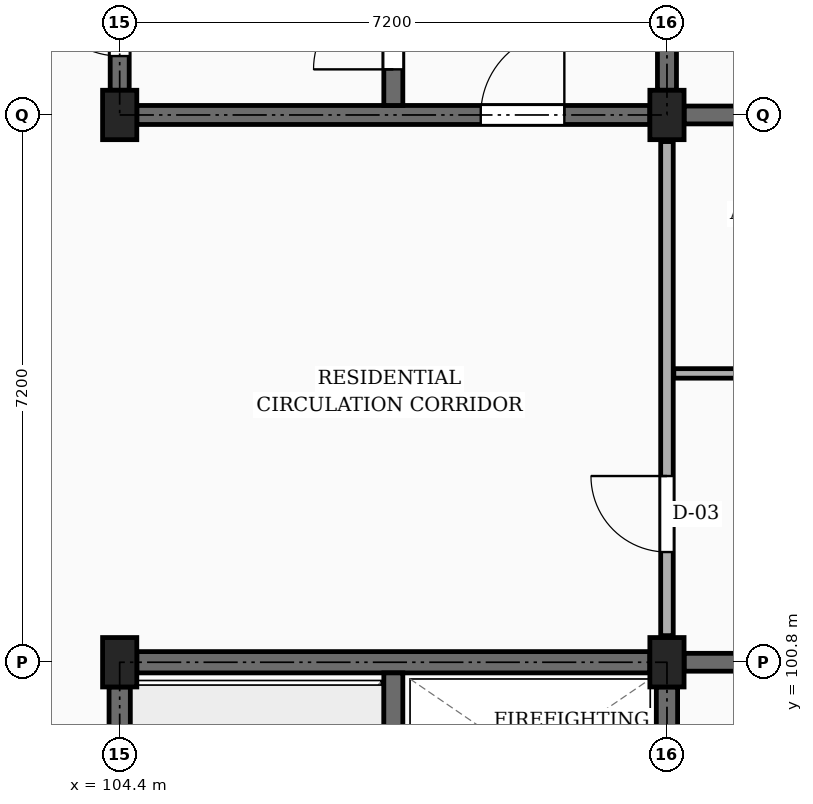
"""IFC4 building model, lengths in metres.
Left out: names, types, materials, properties, quantities, classifications, styles, units other than length and angle.
Written with IfcOpenShell. Run it as: python <this file> out.ifc"""

import sys

from ifc_helpers import new_model, si_unit, direction, frame, frame_2d, origin, origin_2d, place, context, subcontext, project, spatial, rectangle, extrude, element, fill, save


model = new_model("IFC4")
c1 = context("Model", 3, precision=1e-05, world=origin(), true_north=direction((0.0, 1.0)))
c2 = subcontext(c1, "Body", "Model", "MODEL_VIEW")
j1 = project(units=[si_unit("LENGTHUNIT", "METRE"), si_unit("PLANEANGLEUNIT", "RADIAN")], contexts=[c1])
p1 = place(None, origin())
s1 = spatial("IfcSite", under=j1, at=p1, CompositionType="ELEMENT")
p2 = place(p1, origin())
s2 = spatial("IfcBuilding", under=s1, at=p2, CompositionType="ELEMENT")
p3 = place(p2, frame((0.0, 0.0, 17.1)))
s3 = spatial("IfcBuildingStorey", under=s2, at=p3, CompositionType="ELEMENT", Elevation=17.1)
for number, where, z_axis, x_axis in (
    (1, (104.4, 100.8, 0.0), (0.0, 0.0, 1.0), (1.0, 0.0, 0.0)),
    (2, (104.4, 108.0, 0.0), (0.0, 0.0, 1.0), (1.0, 0.0, 0.0)),
    (3, (111.6, 100.8, 0.0), (0.0, 0.0, 1.0), (1.0, 0.0, 0.0)),
    (4, (111.6, 108.0, 0.0), (0.0, 0.0, 1.0), (1.0, 0.0, 0.0)),
):
    element("IfcColumn", number, at=place(p3, frame(where, z_axis=z_axis, x_axis=x_axis)), inside=s3, PredefinedType="COLUMN", context=c2, shape_type="SweptSolid", body=[
        extrude(rectangle(XDim=0.45, YDim=0.65, at=origin_2d()), origin(), (0.0, 0.0, 1.0), 3.15),
    ])
p4 = place(p3, frame((111.825, 100.8, 0.0), z_axis=(0.0, 0.0, 1.0), x_axis=(1.0, 0.0, 0.0)))
e5 = element("IfcWall", 5, at=p4, inside=s3, PredefinedType="SOLIDWALL", context=c2, shape_type="SweptSolid", body=[
    extrude(rectangle(XDim=6.7, YDim=0.235, at=frame_2d((3.35, 0.0))), origin(), (0.0, 0.0, 1.0), 2.19),
])
p5 = place(p3, frame((111.825, 108.0, 0.0), z_axis=(0.0, 0.0, 1.0), x_axis=(1.0, 0.0, 0.0)))
e6 = element("IfcWall", 6, at=p5, inside=s3, PredefinedType="SOLIDWALL", context=c2, shape_type="SweptSolid", body=[
    extrude(rectangle(XDim=6.7, YDim=0.235, at=frame_2d((3.35, 0.0))), origin(), (0.0, 0.0, 1.0), 2.19),
])
p6 = place(p5, frame((4.35, 0.0, 0.0)))
e7 = element("IfcOpeningElement", 7, at=p6, cuts=e6, PredefinedType="OPENING", context=c2, shape_type="SweptSolid", body=[
    extrude(rectangle(XDim=0.98, YDim=2.12, at=frame_2d((0.49, 1.06))), frame((0.0, 0.127, 0.0), z_axis=(0.0, -1.0, 0.0), x_axis=(1.0, 0.0, 0.0)), (0.0, 0.0, 1.0), 0.255),
])
p7 = place(p3, frame((104.4, 93.925, 0.0), z_axis=(0.0, 0.0, 1.0), x_axis=(0.0, 1.0, 0.0)))
e8 = element("IfcWall", 8, at=p7, inside=s3, PredefinedType="SHEAR", context=c2, shape_type="SweptSolid", body=[
    extrude(rectangle(XDim=6.55, YDim=0.28, at=frame_2d((3.275, 0.0))), origin(), (0.0, 0.0, 1.0), 2.89),
])
p8 = place(p7, frame((0.45, 0.0, 0.0)))
e9 = element("IfcOpeningElement", 9, at=p8, cuts=e8, PredefinedType="OPENING", context=c2, shape_type="SweptSolid", body=[
    extrude(rectangle(XDim=1.05, YDim=2.15, at=frame_2d((0.525, 1.075))), frame((0.0, 0.15, 0.0), z_axis=(0.0, -1.0, 0.0), x_axis=(1.0, 0.0, 0.0)), (0.0, 0.0, 1.0), 0.3),
])
p9 = place(p3, frame((104.625, 100.8, 0.0), z_axis=(0.0, 0.0, 1.0), x_axis=(1.0, 0.0, 0.0)))
e10 = element("IfcWall", 10, at=p9, inside=s3, PredefinedType="SHEAR", context=c2, shape_type="SweptSolid", body=[
    extrude(rectangle(XDim=6.75, YDim=0.28, at=frame_2d((3.375, 0.0))), origin(), (0.0, 0.0, 1.0), 2.89),
])
p10 = place(p3, frame((111.6, 93.925, 0.0), z_axis=(0.0, 0.0, 1.0), x_axis=(0.0, 1.0, 0.0)))
e11 = element("IfcWall", 11, at=p10, inside=s3, PredefinedType="SHEAR", context=c2, shape_type="SweptSolid", body=[
    extrude(rectangle(XDim=6.55, YDim=0.28, at=frame_2d((3.275, 0.0))), origin(), (0.0, 0.0, 1.0), 2.89),
])
p11 = place(p3, frame((108.0, 93.74, 0.0), z_axis=(0.0, 0.0, 1.0), x_axis=(0.0, 1.0, 0.0)))
e12 = element("IfcWall", 12, at=p11, inside=s3, PredefinedType="SHEAR", context=c2, shape_type="SweptSolid", body=[
    extrude(rectangle(XDim=6.92, YDim=0.25, at=frame_2d((3.46, 0.0))), origin(), (0.0, 0.0, 1.0), 2.89),
])
p12 = place(p11, frame((0.46, 0.0, 0.0)))
e13 = element("IfcOpeningElement", 13, at=p12, cuts=e12, PredefinedType="OPENING", context=c2, shape_type="SweptSolid", body=[
    extrude(rectangle(XDim=1.05, YDim=2.15, at=frame_2d((0.525, 1.075))), frame((0.0, 0.135, 0.0), z_axis=(0.0, -1.0, 0.0), x_axis=(1.0, 0.0, 0.0)), (0.0, 0.0, 1.0), 0.27),
])
p13 = place(p3, frame((104.4, 108.325, 0.0), z_axis=(0.0, 0.0, 1.0), x_axis=(0.0, 1.0, 0.0)))
e14 = element("IfcWall", 14, at=p13, inside=s3, PredefinedType="SHEAR", context=c2, shape_type="SweptSolid", body=[
    extrude(rectangle(XDim=6.55, YDim=0.25, at=frame_2d((3.275, 0.0))), origin(), (0.0, 0.0, 1.0), 2.89),
])
p14 = place(p13, frame((0.45, 0.0, 0.0)))
e15 = element("IfcOpeningElement", 15, at=p14, cuts=e14, PredefinedType="OPENING", context=c2, shape_type="SweptSolid", body=[
    extrude(rectangle(XDim=1.05, YDim=2.15, at=frame_2d((0.525, 1.075))), frame((0.0, 0.135, 0.0), z_axis=(0.0, -1.0, 0.0), x_axis=(1.0, 0.0, 0.0)), (0.0, 0.0, 1.0), 0.27),
])
p15 = place(p3, frame((111.6, 108.325, 0.0), z_axis=(0.0, 0.0, 1.0), x_axis=(0.0, 1.0, 0.0)))
e16 = element("IfcWall", 16, at=p15, inside=s3, PredefinedType="SHEAR", context=c2, shape_type="SweptSolid", body=[
    extrude(rectangle(XDim=6.55, YDim=0.25, at=frame_2d((3.275, 0.0))), origin(), (0.0, 0.0, 1.0), 2.89),
])
p16 = place(p3, frame((104.625, 108.0, 0.0), z_axis=(0.0, 0.0, 1.0), x_axis=(1.0, 0.0, 0.0)))
e17 = element("IfcWall", 17, at=p16, inside=s3, PredefinedType="SHEAR", context=c2, shape_type="SweptSolid", body=[
    extrude(rectangle(XDim=6.75, YDim=0.25, at=frame_2d((3.375, 0.0))), origin(), (0.0, 0.0, 1.0), 2.89),
])
p17 = place(p16, frame((4.525, 0.0, 0.0)))
e18 = element("IfcOpeningElement", 18, at=p17, cuts=e17, PredefinedType="OPENING", context=c2, shape_type="SweptSolid", body=[
    extrude(rectangle(XDim=1.1, YDim=2.15, at=frame_2d((0.55, 1.075))), frame((0.0, 0.135, 0.0), z_axis=(0.0, -1.0, 0.0), x_axis=(1.0, 0.0, 0.0)), (0.0, 0.0, 1.0), 0.27),
])
p18 = place(p3, frame((108.0, 108.125, 0.0), z_axis=(0.0, 0.0, 1.0), x_axis=(0.0, 1.0, 0.0)))
e19 = element("IfcWall", 19, at=p18, inside=s3, PredefinedType="SHEAR", context=c2, shape_type="SweptSolid", body=[
    extrude(rectangle(XDim=6.95, YDim=0.25, at=frame_2d((3.475, 0.0))), origin(), (0.0, 0.0, 1.0), 2.89),
])
p19 = place(p18, frame((0.475, 0.0, 0.0)))
e20 = element("IfcOpeningElement", 20, at=p19, cuts=e19, PredefinedType="OPENING", context=c2, shape_type="SweptSolid", body=[
    extrude(rectangle(XDim=1.05, YDim=2.15, at=frame_2d((0.525, 1.075))), frame((0.0, 0.135, 0.0), z_axis=(0.0, -1.0, 0.0), x_axis=(1.0, 0.0, 0.0)), (0.0, 0.0, 1.0), 0.27),
])
p20 = place(p3, frame((111.6, 101.15, 0.0), z_axis=(0.0, 0.0, 1.0), x_axis=(0.0, 1.0, 0.0)))
e21 = element("IfcWall", 21, at=p20, inside=s3, PredefinedType="PARTITIONING", context=c2, shape_type="SweptSolid", body=[
    extrude(rectangle(XDim=6.5, YDim=0.165, at=frame_2d((3.25, 0.0))), origin(), (0.0, 0.0, 1.0), 2.325),
])
p21 = place(p20, frame((1.1, 0.0, 0.0)))
e22 = element("IfcOpeningElement", 22, at=p21, cuts=e21, PredefinedType="OPENING", context=c2, shape_type="SweptSolid", body=[
    extrude(rectangle(XDim=1.0, YDim=2.15, at=frame_2d((0.5, 1.075))), frame((0.0, 0.093, 0.0), z_axis=(0.0, -1.0, 0.0), x_axis=(1.0, 0.0, 0.0)), (0.0, 0.0, 1.0), 0.185),
])
p22 = place(p3, frame((111.69, 104.6, 0.0), z_axis=(0.0, 0.0, 1.0), x_axis=(1.0, 0.0, 0.0)))
e23 = element("IfcWall", 23, at=p22, inside=s3, PredefinedType="PARTITIONING", context=c2, shape_type="SweptSolid", body=[
    extrude(rectangle(XDim=6.935, YDim=0.125, at=frame_2d((3.468, 0.0))), origin(), (0.0, 0.0, 1.0), 2.325),
])
p23 = place(p22, frame((1.1, 0.0, 0.0)))
e24 = element("IfcOpeningElement", 24, at=p23, cuts=e23, PredefinedType="OPENING", context=c2, shape_type="SweptSolid", body=[
    extrude(rectangle(XDim=0.87, YDim=2.05, at=frame_2d((0.435, 1.025))), frame((0.0, 0.073, 0.0), z_axis=(0.0, -1.0, 0.0), x_axis=(1.0, 0.0, 0.0)), (0.0, 0.0, 1.0), 0.145),
])
p24 = place(p22, frame((4.5, 0.0, 0.0)))
e25 = element("IfcOpeningElement", 25, at=p24, cuts=e23, PredefinedType="OPENING", context=c2, shape_type="SweptSolid", body=[
    extrude(rectangle(XDim=0.92, YDim=2.1, at=frame_2d((0.46, 1.05))), frame((0.0, 0.073, 0.0), z_axis=(0.0, -1.0, 0.0), x_axis=(1.0, 0.0, 0.0)), (0.0, 0.0, 1.0), 0.145),
])
p25 = place(p14, origin())
e26 = element("IfcDoor", 26, at=p25, inside=s3, OperationType="SINGLE_SWING_RIGHT", PredefinedType="DOOR", context=c2, shape_type="SweptSolid", body=[
    extrude(rectangle(XDim=1.05, YDim=2.15, at=frame_2d((0.525, 1.075))), frame((0.0, 0.025, 0.0), z_axis=(0.0, -1.0, 0.0), x_axis=(1.0, 0.0, 0.0)), (0.0, 0.0, 1.0), 0.05),
])
fill(e15, e26)
p26 = place(p17, frame((1.1, 0.0, 0.0), z_axis=(0.0, 0.0, 1.0), x_axis=(-1.0, 0.0, 0.0)))
e27 = element("IfcDoor", 27, at=p26, inside=s3, OperationType="SINGLE_SWING_RIGHT", PredefinedType="DOOR", context=c2, shape_type="SweptSolid", body=[
    extrude(rectangle(XDim=1.1, YDim=2.15, at=frame_2d((0.55, 1.075))), frame((0.0, 0.025, 0.0), z_axis=(0.0, -1.0, 0.0), x_axis=(1.0, 0.0, 0.0)), (0.0, 0.0, 1.0), 0.05),
])
fill(e18, e27)
p27 = place(p19, origin())
e28 = element("IfcDoor", 28, at=p27, inside=s3, OperationType="SINGLE_SWING_LEFT", PredefinedType="DOOR", context=c2, shape_type="SweptSolid", body=[
    extrude(rectangle(XDim=1.05, YDim=2.15, at=frame_2d((0.525, 1.075))), frame((0.0, 0.025, 0.0), z_axis=(0.0, -1.0, 0.0), x_axis=(1.0, 0.0, 0.0)), (0.0, 0.0, 1.0), 0.05),
])
fill(e20, e28)
p28 = place(p21, origin())
e29 = element("IfcDoor", 29, at=p28, inside=s3, OperationType="SINGLE_SWING_RIGHT", PredefinedType="DOOR", context=c2, shape_type="SweptSolid", body=[
    extrude(rectangle(XDim=1.0, YDim=2.15, at=frame_2d((0.5, 1.075))), frame((0.0, 0.025, 0.0), z_axis=(0.0, -1.0, 0.0), x_axis=(1.0, 0.0, 0.0)), (0.0, 0.0, 1.0), 0.05),
])
fill(e22, e29)
save(model, sys.argv[1])
